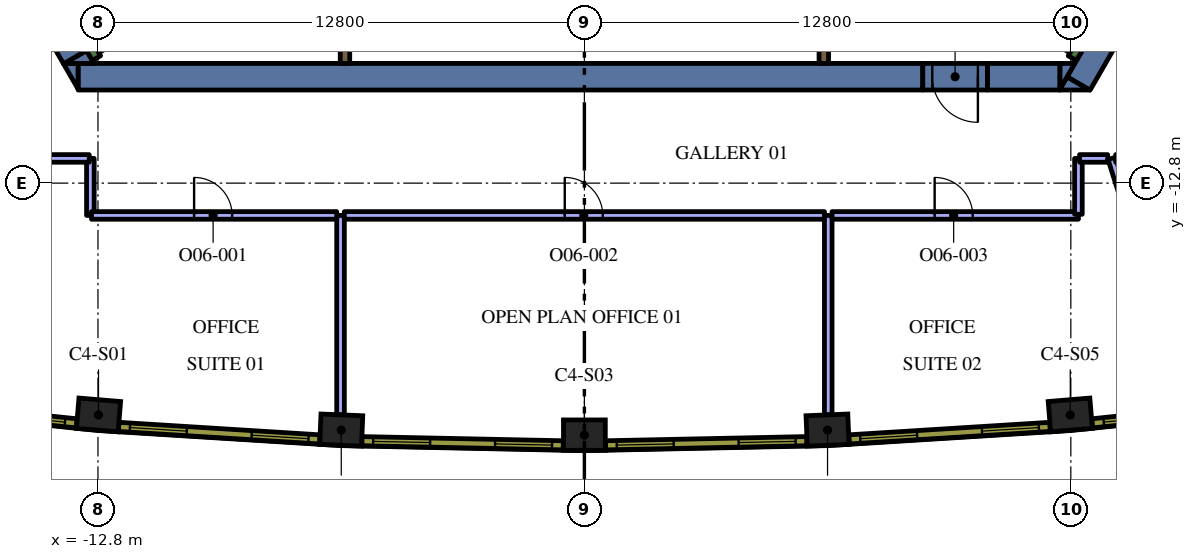
"""IFC4 building model, lengths in metres.
Left out: names, types, materials, properties, quantities, classifications, styles, units other than length and angle.
Written with IfcOpenShell. Run it as: python <this file> out.ifc"""

import sys

from ifc_helpers import new_model, si_unit, direction, frame, frame_2d, origin, origin_2d, place, context, subcontext, project, spatial, polyline, rectangle, outline, extrude, element, fill, save


model = new_model("IFC4")
c1 = context("Model", 3, precision=1e-05, world=origin(), true_north=direction((0.0, 1.0)))
c2 = subcontext(c1, "Body", "Model", "MODEL_VIEW")
j1 = project(units=[si_unit("LENGTHUNIT", "METRE"), si_unit("PLANEANGLEUNIT", "RADIAN")], contexts=[c1])
p1 = place(None, origin())
s1 = spatial("IfcSite", under=j1, at=p1, CompositionType="ELEMENT")
p2 = place(p1, origin())
s2 = spatial("IfcBuilding", under=s1, at=p2, CompositionType="ELEMENT")
p3 = place(p2, frame((0.0, 0.0, 201.6)))
s3 = spatial("IfcBuildingStorey", under=s2, at=p3, CompositionType="ELEMENT", Elevation=201.6)
for number, where, z_axis, x_axis in (
    (1, (-12.785, -18.9, 0.0), (0.0, 0.0, 1.0), (0.997, -0.083, 0.0)),
    (2, (-6.398, -19.298, 0.0), (0.0, 0.0, 1.0), (0.999, -0.041, 0.0)),
    (3, (0.0, -19.431, 0.0), (0.0, 0.0, 1.0), (1.0, 0.0, 0.0)),
    (4, (6.398, -19.298, 0.0), (0.0, 0.0, 1.0), (0.999, 0.041, 0.0)),
    (5, (12.785, -18.9, 0.0), (0.0, 0.0, 1.0), (0.997, 0.083, 0.0)),
):
    element("IfcColumn", number, at=place(p3, frame(where, z_axis=z_axis, x_axis=x_axis)), inside=s3, PredefinedType="COLUMN", context=c2, shape_type="SweptSolid", body=[
        extrude(rectangle(XDim=1.1, YDim=0.8, at=origin_2d()), origin(), (0.0, 0.0, 1.0), 4.2),
    ])
p4 = place(p3, frame((13.003, -10.179, 0.0), z_axis=(0.0, 0.0, 1.0), x_axis=(0.499972675833, 0.866041178825, 0.0)))
e6 = element("IfcWall", 6, at=p4, inside=s3, PredefinedType="SOLIDWALL", context=c2, shape_type="SweptSolid", body=[
    extrude(rectangle(XDim=3.829, YDim=0.7, at=frame_2d((1.915, 0.0))), origin(), (0.0, 0.0, 1.0), 4.2),
])
p5 = place(p3, origin())
e7 = element("IfcWall", 7, at=p5, inside=s3, PredefinedType="SOLIDWALL", context=c2, shape_type="SweptSolid", body=[
    extrude(outline(polyline([(12.5, -10.35), (12.698, -10.005), (13.296, -10.35), (12.5, -10.35)])), origin(), (0.0, 0.0, 1.0), 4.2),
])
p6 = place(p3, frame((10.604, -10.0, 0.0), z_axis=(0.0, 0.0, 1.0), x_axis=(1.0, 0.0, 0.0)))
e8 = element("IfcWall", 8, at=p6, inside=s3, PredefinedType="SOLIDWALL", context=c2, shape_type="SweptSolid", body=[
    extrude(rectangle(XDim=1.909, YDim=0.7, at=frame_2d((0.955, 0.0))), origin(), (0.0, 0.0, 1.0), 4.2),
])
e9 = element("IfcWall", 9, at=p5, inside=s3, PredefinedType="SOLIDWALL", context=c2, shape_type="SweptSolid", body=[
    extrude(outline(polyline([(12.904, -9.65), (12.516, -10.322), (12.516, -9.65), (12.904, -9.65)])), origin(), (0.0, 0.0, 1.0), 4.2),
])
p7 = place(p3, frame((8.904, -10.0, 0.0), z_axis=(0.0, 0.0, 1.0), x_axis=(-1.0, 0.0, 0.0)))
e10 = element("IfcWall", 10, at=p7, inside=s3, PredefinedType="SOLIDWALL", context=c2, shape_type="SweptSolid", body=[
    extrude(rectangle(XDim=22.226, YDim=0.7, at=frame_2d((11.113, 0.0))), origin(), (0.0, 0.0, 1.0), 4.2),
])
e11 = element("IfcWall", 11, at=p5, inside=s3, PredefinedType="SOLIDWALL", context=c2, shape_type="SweptSolid", body=[
    extrude(outline(polyline([(-13.712, -9.65), (-13.324, -9.65), (-13.324, -10.322), (-13.712, -9.65)])), origin(), (0.0, 0.0, 1.0), 4.2),
])
p8 = place(p3, frame((-13.402, -9.487, 0.0), z_axis=(0.0, 0.0, 1.0), x_axis=(-0.500020498207, 0.866013568815, 0.0)))
e12 = element("IfcWall", 12, at=p8, inside=s3, PredefinedType="SOLIDWALL", context=c2, shape_type="SweptSolid", body=[
    extrude(rectangle(XDim=3.829, YDim=0.7, at=frame_2d((1.915, 0.0))), origin(), (0.0, 0.0, 1.0), 4.2),
])
e13 = element("IfcWall", 13, at=p5, inside=s3, PredefinedType="SOLIDWALL", context=c2, shape_type="SweptSolid", body=[
    extrude(outline(polyline([(-12.904, -9.65), (-13.68, -9.65), (-13.098, -9.314), (-12.904, -9.65)])), origin(), (0.0, 0.0, 1.0), 4.2),
])
p9 = place(p3, frame((12.84, -9.511, 0.0), z_axis=(0.0, 0.0, 1.0), x_axis=(0.500048121057, 0.865997619297, 0.0)))
e14 = element("IfcWall", 14, at=p9, inside=s3, PredefinedType="SOLIDWALL", context=c2, shape_type="SweptSolid", body=[
    extrude(rectangle(XDim=3.634, YDim=0.25, at=frame_2d((1.817, 0.0))), origin(), (0.0, 0.0, 1.0), 4.2),
])
p10 = place(p3, frame((12.84, -9.261, 0.0), z_axis=(0.0, 0.0, 1.0), x_axis=(-0.866013990052, 0.500019768644, 0.0)))
e15 = element("IfcWall", 15, at=p10, inside=s3, PredefinedType="SOLIDWALL", context=c2, shape_type="SweptSolid", body=[
    extrude(rectangle(XDim=6.8, YDim=0.25, at=frame_2d((3.4, 0.0))), origin(), (0.0, 0.0, 1.0), 4.2),
])
p11 = place(p3, frame((-12.84, -9.511, 0.0), z_axis=(0.0, 0.0, 1.0), x_axis=(-0.499997733992, 0.866026712061, 0.0)))
e16 = element("IfcWall", 16, at=p11, inside=s3, PredefinedType="SOLIDWALL", context=c2, shape_type="SweptSolid", body=[
    extrude(rectangle(XDim=3.634, YDim=0.25, at=frame_2d((1.817, 0.0))), origin(), (0.0, 0.0, 1.0), 4.2),
])
p12 = place(p3, frame((-12.84, -9.261, 0.0), z_axis=(0.0, 0.0, 1.0), x_axis=(0.866016039709, 0.500016218704, 0.0)))
e17 = element("IfcWall", 17, at=p12, inside=s3, PredefinedType="SOLIDWALL", context=c2, shape_type="SweptSolid", body=[
    extrude(rectangle(XDim=7.05, YDim=0.25, at=frame_2d((3.525, 0.0))), origin(), (0.0, 0.0, 1.0), 4.2),
])
p13 = place(p3, frame((-6.3, -8.925, 0.0), z_axis=(0.0, 0.0, 1.0), x_axis=(0.0, -1.0, 0.0)))
e18 = element("IfcWall", 18, at=p13, inside=s3, PredefinedType="SOLIDWALL", context=c2, shape_type="SweptSolid", body=[
    extrude(rectangle(XDim=0.725, YDim=0.25, at=frame_2d((0.363, 0.0))), origin(), (0.0, 0.0, 1.0), 4.2),
])
p14 = place(p3, frame((6.3, -9.65, 0.0), z_axis=(0.0, 0.0, 1.0), x_axis=(0.0, 1.0, 0.0)))
e19 = element("IfcWall", 19, at=p14, inside=s3, PredefinedType="SOLIDWALL", context=c2, shape_type="SweptSolid", body=[
    extrude(rectangle(XDim=1.008, YDim=0.25, at=frame_2d((0.504, 0.0))), origin(), (0.0, 0.0, 1.0), 4.2),
])
p15 = place(p3, frame((10.604, -10.0, 0.0), z_axis=(0.0, 0.0, 1.0), x_axis=(-1.0, 0.0, 0.0)))
e20 = element("IfcWall", 20, at=p15, inside=s3, PredefinedType="SOLIDWALL", context=c2, shape_type="SweptSolid", body=[
    extrude(rectangle(XDim=1.7, YDim=0.7, at=frame_2d((0.85, 0.0))), origin(), (0.0, 0.0, 1.0), 4.2),
])
p16 = place(p15, frame((0.25, 0.0, 0.0)))
e21 = element("IfcOpeningElement", 21, at=p16, cuts=e20, PredefinedType="OPENING", context=c2, shape_type="SweptSolid", body=[
    extrude(rectangle(XDim=1.2, YDim=2.1, at=frame_2d((0.6, 1.05))), frame((0.0, 0.36, 0.0), z_axis=(0.0, -1.0, 0.0), x_axis=(1.0, 0.0, 0.0)), (0.0, 0.0, 1.0), 0.72),
])
p17 = place(p3, frame((-6.417, -13.65, 0.0), z_axis=(0.0, 0.0, 1.0), x_axis=(0.0, -1.0, 0.0)))
e22 = element("IfcWall", 22, at=p17, inside=s3, PredefinedType="PARTITIONING", context=c2, shape_type="SweptSolid", body=[
    extrude(rectangle(XDim=5.247, YDim=0.2, at=frame_2d((2.624, 0.0))), origin(), (0.0, 0.0, 1.0), 3.45),
])
p18 = place(p3, frame((-13.0, -12.15, 0.0), z_axis=(0.0, 0.0, 1.0), x_axis=(0.0, -1.0, 0.0)))
e23 = element("IfcWall", 23, at=p18, inside=s3, PredefinedType="PARTITIONING", context=c2, shape_type="SweptSolid", body=[
    extrude(rectangle(XDim=1.5, YDim=0.2, at=frame_2d((0.75, 0.0))), origin(), (0.0, 0.0, 1.0), 3.45),
])
p19 = place(p3, frame((-12.97, -13.65, 0.0), z_axis=(0.0, 0.0, 1.0), x_axis=(1.0, 0.0, 0.0)))
e24 = element("IfcWall", 24, at=p19, inside=s3, PredefinedType="PARTITIONING", context=c2, shape_type="SweptSolid", body=[
    extrude(rectangle(XDim=6.453, YDim=0.2, at=frame_2d((3.227, 0.0))), origin(), (0.0, 0.0, 1.0), 3.45),
])
p20 = place(p19, frame((2.7, 0.0, 0.0)))
e25 = element("IfcOpeningElement", 25, at=p20, cuts=e24, PredefinedType="OPENING", context=c2, shape_type="SweptSolid", body=[
    extrude(rectangle(XDim=1.0, YDim=2.1, at=frame_2d((0.5, 1.05))), frame((0.0, 0.11, 0.0), z_axis=(0.0, -1.0, 0.0), x_axis=(1.0, 0.0, 0.0)), (0.0, 0.0, 1.0), 0.22),
])
p21 = place(p3, frame((-14.347, -12.15, 0.0), z_axis=(0.0, 0.0, 1.0), x_axis=(1.0, 0.0, 0.0)))
e26 = element("IfcWall", 26, at=p21, inside=s3, PredefinedType="PARTITIONING", context=c2, shape_type="SweptSolid", body=[
    extrude(rectangle(XDim=1.317, YDim=0.2, at=frame_2d((0.659, 0.0))), origin(), (0.0, 0.0, 1.0), 3.45),
])
p22 = place(p3, frame((6.417, -13.65, 0.0), z_axis=(0.0, 0.0, 1.0), x_axis=(0.0, -1.0, 0.0)))
e27 = element("IfcWall", 27, at=p22, inside=s3, PredefinedType="PARTITIONING", context=c2, shape_type="SweptSolid", body=[
    extrude(rectangle(XDim=5.247, YDim=0.2, at=frame_2d((2.624, 0.0))), origin(), (0.0, 0.0, 1.0), 3.45),
])
p23 = place(p3, frame((-6.317, -13.65, 0.0), z_axis=(0.0, 0.0, 1.0), x_axis=(1.0, 0.0, 0.0)))
e28 = element("IfcWall", 28, at=p23, inside=s3, PredefinedType="PARTITIONING", context=c2, shape_type="SweptSolid", body=[
    extrude(rectangle(XDim=12.634, YDim=0.2, at=frame_2d((6.317, 0.0))), origin(), (0.0, 0.0, 1.0), 3.45),
])
p24 = place(p23, frame((5.8, 0.0, 0.0)))
e29 = element("IfcOpeningElement", 29, at=p24, cuts=e28, PredefinedType="OPENING", context=c2, shape_type="SweptSolid", body=[
    extrude(rectangle(XDim=1.0, YDim=2.1, at=frame_2d((0.5, 1.05))), frame((0.0, 0.11, 0.0), z_axis=(0.0, -1.0, 0.0), x_axis=(1.0, 0.0, 0.0)), (0.0, 0.0, 1.0), 0.22),
])
p25 = place(p3, frame((13.875, -12.15, 0.0), z_axis=(0.0, 0.0, 1.0), x_axis=(0.3005606746, -0.953762696316, 0.0)))
e30 = element("IfcWall", 30, at=p25, inside=s3, PredefinedType="PARTITIONING", context=c2, shape_type="SweptSolid", body=[
    extrude(rectangle(XDim=6.9, YDim=0.2, at=frame_2d((3.45, 0.0))), origin(), (0.0, 0.0, 1.0), 3.45),
])
p26 = place(p3, frame((6.517, -13.65, 0.0), z_axis=(0.0, 0.0, 1.0), x_axis=(1.0, 0.0, 0.0)))
e31 = element("IfcWall", 31, at=p26, inside=s3, PredefinedType="PARTITIONING", context=c2, shape_type="SweptSolid", body=[
    extrude(rectangle(XDim=6.483, YDim=0.2, at=frame_2d((3.242, 0.0))), origin(), (0.0, 0.0, 1.0), 3.45),
])
p27 = place(p26, frame((2.7, 0.0, 0.0)))
e32 = element("IfcOpeningElement", 32, at=p27, cuts=e31, PredefinedType="OPENING", context=c2, shape_type="SweptSolid", body=[
    extrude(rectangle(XDim=1.0, YDim=2.1, at=frame_2d((0.5, 1.05))), frame((0.0, 0.11, 0.0), z_axis=(0.0, -1.0, 0.0), x_axis=(1.0, 0.0, 0.0)), (0.0, 0.0, 1.0), 0.22),
])
p28 = place(p3, frame((13.0, -13.62, 0.0), z_axis=(0.0, 0.0, 1.0), x_axis=(0.0, 1.0, 0.0)))
e33 = element("IfcWall", 33, at=p28, inside=s3, PredefinedType="PARTITIONING", context=c2, shape_type="SweptSolid", body=[
    extrude(rectangle(XDim=1.47, YDim=0.2, at=frame_2d((0.735, 0.0))), origin(), (0.0, 0.0, 1.0), 3.45),
])
p29 = place(p3, frame((13.03, -12.15, 0.0), z_axis=(0.0, 0.0, 1.0), x_axis=(1.0, 0.0, 0.0)))
e34 = element("IfcWall", 34, at=p29, inside=s3, PredefinedType="PARTITIONING", context=c2, shape_type="SweptSolid", body=[
    extrude(rectangle(XDim=0.74, YDim=0.2, at=frame_2d((0.37, 0.0))), origin(), (0.0, 0.0, 1.0), 3.45),
])
p30 = place(p3, frame((13.98, -12.15, 0.0), z_axis=(0.0, 0.0, 1.0), x_axis=(1.0, 0.0, 0.0)))
e35 = element("IfcWall", 35, at=p30, inside=s3, PredefinedType="PARTITIONING", context=c2, shape_type="SweptSolid", body=[
    extrude(rectangle(XDim=0.367, YDim=0.2, at=frame_2d((0.184, 0.0))), origin(), (0.0, 0.0, 1.0), 3.45),
])
p31 = place(p3, frame((-18.644, -18.571, 0.0), z_axis=(0.0, 0.0, 1.0), x_axis=(0.994621961215, -0.103571976272, 0.0)))
e36 = element("IfcWall", 36, at=p31, inside=s3, PredefinedType="SOLIDWALL", context=c2, shape_type="SweptSolid", body=[
    extrude(rectangle(XDim=5.311, YDim=0.24, at=frame_2d((2.655, 0.0))), origin(), (0.0, 0.0, 1.0), 3.95),
])
p32 = place(p31, frame((0.271, 0.0, 0.9)))
e37 = element("IfcOpeningElement", 37, at=p32, cuts=e36, PredefinedType="OPENING", context=c2, shape_type="SweptSolid", body=[
    extrude(rectangle(XDim=1.5, YDim=2.55, at=frame_2d((0.75, 1.275))), frame((0.0, 0.13, 0.0), z_axis=(0.0, -1.0, 0.0), x_axis=(1.0, 0.0, 0.0)), (0.0, 0.0, 1.0), 0.26),
])
p33 = place(p31, frame((3.504, 0.0, 0.9)))
e38 = element("IfcOpeningElement", 38, at=p33, cuts=e36, PredefinedType="OPENING", context=c2, shape_type="SweptSolid", body=[
    extrude(rectangle(XDim=1.5, YDim=2.55, at=frame_2d((0.75, 1.275))), frame((0.0, 0.13, 0.0), z_axis=(0.0, -1.0, 0.0), x_axis=(1.0, 0.0, 0.0)), (0.0, 0.0, 1.0), 0.26),
])
p34 = place(p3, frame((-12.253, -19.213, 0.0), z_axis=(0.0, 0.0, 1.0), x_axis=(0.9980633213, -0.062206162685, 0.0)))
e39 = element("IfcWall", 39, at=p34, inside=s3, PredefinedType="SOLIDWALL", context=c2, shape_type="SweptSolid", body=[
    extrude(rectangle(XDim=5.298, YDim=0.24, at=frame_2d((2.649, 0.0))), origin(), (0.0, 0.0, 1.0), 3.95),
])
p35 = place(p34, frame((0.294, 0.0, 0.9)))
e40 = element("IfcOpeningElement", 40, at=p35, cuts=e39, PredefinedType="OPENING", context=c2, shape_type="SweptSolid", body=[
    extrude(rectangle(XDim=1.5, YDim=2.55, at=frame_2d((0.75, 1.275))), frame((0.0, 0.13, 0.0), z_axis=(0.0, -1.0, 0.0), x_axis=(1.0, 0.0, 0.0)), (0.0, 0.0, 1.0), 0.26),
])
p36 = place(p34, frame((3.504, 0.0, 0.9)))
e41 = element("IfcOpeningElement", 41, at=p36, cuts=e39, PredefinedType="OPENING", context=c2, shape_type="SweptSolid", body=[
    extrude(rectangle(XDim=1.5, YDim=2.55, at=frame_2d((0.75, 1.275))), frame((0.0, 0.13, 0.0), z_axis=(0.0, -1.0, 0.0), x_axis=(1.0, 0.0, 0.0)), (0.0, 0.0, 1.0), 0.26),
])
p37 = place(p3, frame((-5.854, -19.589, 0.0), z_axis=(0.0, 0.0, 1.0), x_axis=(0.999784035184, -0.020781794712, 0.0)))
e42 = element("IfcWall", 42, at=p37, inside=s3, PredefinedType="SOLIDWALL", context=c2, shape_type="SweptSolid", body=[
    extrude(rectangle(XDim=5.298, YDim=0.24, at=frame_2d((2.649, 0.0))), origin(), (0.0, 0.0, 1.0), 3.95),
])
p38 = place(p37, frame((0.294, 0.0, 0.9)))
e43 = element("IfcOpeningElement", 43, at=p38, cuts=e42, PredefinedType="OPENING", context=c2, shape_type="SweptSolid", body=[
    extrude(rectangle(XDim=1.5, YDim=2.55, at=frame_2d((0.75, 1.275))), frame((0.0, 0.13, 0.0), z_axis=(0.0, -1.0, 0.0), x_axis=(1.0, 0.0, 0.0)), (0.0, 0.0, 1.0), 0.26),
])
p39 = place(p37, frame((3.504, 0.0, 0.9)))
e44 = element("IfcOpeningElement", 44, at=p39, cuts=e42, PredefinedType="OPENING", context=c2, shape_type="SweptSolid", body=[
    extrude(rectangle(XDim=1.5, YDim=2.55, at=frame_2d((0.75, 1.275))), frame((0.0, 0.13, 0.0), z_axis=(0.0, -1.0, 0.0), x_axis=(1.0, 0.0, 0.0)), (0.0, 0.0, 1.0), 0.26),
])
p40 = place(p3, frame((0.556, -19.699, 0.0), z_axis=(0.0, 0.0, 1.0), x_axis=(0.999784035184, 0.020781794712, 0.0)))
e45 = element("IfcWall", 45, at=p40, inside=s3, PredefinedType="SOLIDWALL", context=c2, shape_type="SweptSolid", body=[
    extrude(rectangle(XDim=5.298, YDim=0.24, at=frame_2d((2.649, 0.0))), origin(), (0.0, 0.0, 1.0), 3.95),
])
p41 = place(p40, frame((0.294, 0.0, 0.9)))
e46 = element("IfcOpeningElement", 46, at=p41, cuts=e45, PredefinedType="OPENING", context=c2, shape_type="SweptSolid", body=[
    extrude(rectangle(XDim=1.5, YDim=2.55, at=frame_2d((0.75, 1.275))), frame((0.0, 0.13, 0.0), z_axis=(0.0, -1.0, 0.0), x_axis=(1.0, 0.0, 0.0)), (0.0, 0.0, 1.0), 0.26),
])
p42 = place(p40, frame((3.504, 0.0, 0.9)))
e47 = element("IfcOpeningElement", 47, at=p42, cuts=e45, PredefinedType="OPENING", context=c2, shape_type="SweptSolid", body=[
    extrude(rectangle(XDim=1.5, YDim=2.55, at=frame_2d((0.75, 1.275))), frame((0.0, 0.13, 0.0), z_axis=(0.0, -1.0, 0.0), x_axis=(1.0, 0.0, 0.0)), (0.0, 0.0, 1.0), 0.26),
])
p43 = place(p3, frame((6.965, -19.543, 0.0), z_axis=(0.0, 0.0, 1.0), x_axis=(0.9980633213, 0.062206162685, 0.0)))
e48 = element("IfcWall", 48, at=p43, inside=s3, PredefinedType="SOLIDWALL", context=c2, shape_type="SweptSolid", body=[
    extrude(rectangle(XDim=5.298, YDim=0.24, at=frame_2d((2.649, 0.0))), origin(), (0.0, 0.0, 1.0), 3.95),
])
p44 = place(p43, frame((0.295, 0.0, 0.9)))
e49 = element("IfcOpeningElement", 49, at=p44, cuts=e48, PredefinedType="OPENING", context=c2, shape_type="SweptSolid", body=[
    extrude(rectangle(XDim=1.5, YDim=2.55, at=frame_2d((0.75, 1.275))), frame((0.0, 0.13, 0.0), z_axis=(0.0, -1.0, 0.0), x_axis=(1.0, 0.0, 0.0)), (0.0, 0.0, 1.0), 0.26),
])
p45 = place(p43, frame((3.504, 0.0, 0.9)))
e50 = element("IfcOpeningElement", 50, at=p45, cuts=e48, PredefinedType="OPENING", context=c2, shape_type="SweptSolid", body=[
    extrude(rectangle(XDim=1.5, YDim=2.55, at=frame_2d((0.75, 1.275))), frame((0.0, 0.13, 0.0), z_axis=(0.0, -1.0, 0.0), x_axis=(1.0, 0.0, 0.0)), (0.0, 0.0, 1.0), 0.26),
])
p46 = place(p3, frame((13.362, -19.121, 0.0), z_axis=(0.0, 0.0, 1.0), x_axis=(0.994621961215, 0.103571976272, 0.0)))
e51 = element("IfcWall", 51, at=p46, inside=s3, PredefinedType="SOLIDWALL", context=c2, shape_type="SweptSolid", body=[
    extrude(rectangle(XDim=5.311, YDim=0.24, at=frame_2d((2.655, 0.0))), origin(), (0.0, 0.0, 1.0), 3.95),
])
p47 = place(p46, frame((0.306, 0.0, 0.9)))
e52 = element("IfcOpeningElement", 52, at=p47, cuts=e51, PredefinedType="OPENING", context=c2, shape_type="SweptSolid", body=[
    extrude(rectangle(XDim=1.5, YDim=2.55, at=frame_2d((0.75, 1.275))), frame((0.0, 0.13, 0.0), z_axis=(0.0, -1.0, 0.0), x_axis=(1.0, 0.0, 0.0)), (0.0, 0.0, 1.0), 0.26),
])
p48 = place(p46, frame((3.539, 0.0, 0.9)))
e53 = element("IfcOpeningElement", 53, at=p48, cuts=e51, PredefinedType="OPENING", context=c2, shape_type="SweptSolid", body=[
    extrude(rectangle(XDim=1.5, YDim=2.55, at=frame_2d((0.75, 1.275))), frame((0.0, 0.13, 0.0), z_axis=(0.0, -1.0, 0.0), x_axis=(1.0, 0.0, 0.0)), (0.0, 0.0, 1.0), 0.26),
])
p49 = place(p16, origin())
e54 = element("IfcDoor", 54, at=p49, inside=s3, OperationType="SINGLE_SWING_LEFT", PredefinedType="DOOR", context=c2, shape_type="SweptSolid", body=[
    extrude(rectangle(XDim=1.2, YDim=2.1, at=frame_2d((0.6, 1.05))), frame((0.0, 0.025, 0.0), z_axis=(0.0, -1.0, 0.0), x_axis=(1.0, 0.0, 0.0)), (0.0, 0.0, 1.0), 0.05),
])
fill(e21, e54)
p50 = place(p20, origin())
e55 = element("IfcDoor", 55, at=p50, inside=s3, OperationType="SINGLE_SWING_LEFT", PredefinedType="DOOR", context=c2, shape_type="SweptSolid", body=[
    extrude(rectangle(XDim=1.0, YDim=2.1, at=frame_2d((0.5, 1.05))), frame((0.0, 0.025, 0.0), z_axis=(0.0, -1.0, 0.0), x_axis=(1.0, 0.0, 0.0)), (0.0, 0.0, 1.0), 0.05),
])
fill(e25, e55)
p51 = place(p24, origin())
e56 = element("IfcDoor", 56, at=p51, inside=s3, OperationType="SINGLE_SWING_LEFT", PredefinedType="DOOR", context=c2, shape_type="SweptSolid", body=[
    extrude(rectangle(XDim=1.0, YDim=2.1, at=frame_2d((0.5, 1.05))), frame((0.0, 0.025, 0.0), z_axis=(0.0, -1.0, 0.0), x_axis=(1.0, 0.0, 0.0)), (0.0, 0.0, 1.0), 0.05),
])
fill(e29, e56)
p52 = place(p27, origin())
e57 = element("IfcDoor", 57, at=p52, inside=s3, OperationType="SINGLE_SWING_LEFT", PredefinedType="DOOR", context=c2, shape_type="SweptSolid", body=[
    extrude(rectangle(XDim=1.0, YDim=2.1, at=frame_2d((0.5, 1.05))), frame((0.0, 0.025, 0.0), z_axis=(0.0, -1.0, 0.0), x_axis=(1.0, 0.0, 0.0)), (0.0, 0.0, 1.0), 0.05),
])
fill(e32, e57)
p53 = place(p33, origin())
e58 = element("IfcWindow", 58, at=p53, inside=s3, PartitioningType="SINGLE_PANEL", PredefinedType="WINDOW", context=c2, shape_type="SweptSolid", body=[
    extrude(rectangle(XDim=1.5, YDim=2.55, at=frame_2d((0.75, 1.275))), frame((0.0, 0.04, 0.0), z_axis=(0.0, -1.0, 0.0), x_axis=(1.0, 0.0, 0.0)), (0.0, 0.0, 1.0), 0.06),
])
fill(e38, e58)
p54 = place(p35, origin())
e59 = element("IfcWindow", 59, at=p54, inside=s3, PartitioningType="SINGLE_PANEL", PredefinedType="WINDOW", context=c2, shape_type="SweptSolid", body=[
    extrude(rectangle(XDim=1.5, YDim=2.55, at=frame_2d((0.75, 1.275))), frame((0.0, 0.04, 0.0), z_axis=(0.0, -1.0, 0.0), x_axis=(1.0, 0.0, 0.0)), (0.0, 0.0, 1.0), 0.06),
])
fill(e40, e59)
p55 = place(p36, origin())
e60 = element("IfcWindow", 60, at=p55, inside=s3, PartitioningType="SINGLE_PANEL", PredefinedType="WINDOW", context=c2, shape_type="SweptSolid", body=[
    extrude(rectangle(XDim=1.5, YDim=2.55, at=frame_2d((0.75, 1.275))), frame((0.0, 0.04, 0.0), z_axis=(0.0, -1.0, 0.0), x_axis=(1.0, 0.0, 0.0)), (0.0, 0.0, 1.0), 0.06),
])
fill(e41, e60)
p56 = place(p38, origin())
e61 = element("IfcWindow", 61, at=p56, inside=s3, PartitioningType="SINGLE_PANEL", PredefinedType="WINDOW", context=c2, shape_type="SweptSolid", body=[
    extrude(rectangle(XDim=1.5, YDim=2.55, at=frame_2d((0.75, 1.275))), frame((0.0, 0.04, 0.0), z_axis=(0.0, -1.0, 0.0), x_axis=(1.0, 0.0, 0.0)), (0.0, 0.0, 1.0), 0.06),
])
fill(e43, e61)
p57 = place(p39, origin())
e62 = element("IfcWindow", 62, at=p57, inside=s3, PartitioningType="SINGLE_PANEL", PredefinedType="WINDOW", context=c2, shape_type="SweptSolid", body=[
    extrude(rectangle(XDim=1.5, YDim=2.55, at=frame_2d((0.75, 1.275))), frame((0.0, 0.04, 0.0), z_axis=(0.0, -1.0, 0.0), x_axis=(1.0, 0.0, 0.0)), (0.0, 0.0, 1.0), 0.06),
])
fill(e44, e62)
p58 = place(p41, origin())
e63 = element("IfcWindow", 63, at=p58, inside=s3, PartitioningType="SINGLE_PANEL", PredefinedType="WINDOW", context=c2, shape_type="SweptSolid", body=[
    extrude(rectangle(XDim=1.5, YDim=2.55, at=frame_2d((0.75, 1.275))), frame((0.0, 0.04, 0.0), z_axis=(0.0, -1.0, 0.0), x_axis=(1.0, 0.0, 0.0)), (0.0, 0.0, 1.0), 0.06),
])
fill(e46, e63)
p59 = place(p42, origin())
e64 = element("IfcWindow", 64, at=p59, inside=s3, PartitioningType="SINGLE_PANEL", PredefinedType="WINDOW", context=c2, shape_type="SweptSolid", body=[
    extrude(rectangle(XDim=1.5, YDim=2.55, at=frame_2d((0.75, 1.275))), frame((0.0, 0.04, 0.0), z_axis=(0.0, -1.0, 0.0), x_axis=(1.0, 0.0, 0.0)), (0.0, 0.0, 1.0), 0.06),
])
fill(e47, e64)
p60 = place(p44, origin())
e65 = element("IfcWindow", 65, at=p60, inside=s3, PartitioningType="SINGLE_PANEL", PredefinedType="WINDOW", context=c2, shape_type="SweptSolid", body=[
    extrude(rectangle(XDim=1.5, YDim=2.55, at=frame_2d((0.75, 1.275))), frame((0.0, 0.04, 0.0), z_axis=(0.0, -1.0, 0.0), x_axis=(1.0, 0.0, 0.0)), (0.0, 0.0, 1.0), 0.06),
])
fill(e49, e65)
p61 = place(p45, origin())
e66 = element("IfcWindow", 66, at=p61, inside=s3, PartitioningType="SINGLE_PANEL", PredefinedType="WINDOW", context=c2, shape_type="SweptSolid", body=[
    extrude(rectangle(XDim=1.5, YDim=2.55, at=frame_2d((0.75, 1.275))), frame((0.0, 0.04, 0.0), z_axis=(0.0, -1.0, 0.0), x_axis=(1.0, 0.0, 0.0)), (0.0, 0.0, 1.0), 0.06),
])
fill(e50, e66)
p62 = place(p47, origin())
e67 = element("IfcWindow", 67, at=p62, inside=s3, PartitioningType="SINGLE_PANEL", PredefinedType="WINDOW", context=c2, shape_type="SweptSolid", body=[
    extrude(rectangle(XDim=1.5, YDim=2.55, at=frame_2d((0.75, 1.275))), frame((0.0, 0.04, 0.0), z_axis=(0.0, -1.0, 0.0), x_axis=(1.0, 0.0, 0.0)), (0.0, 0.0, 1.0), 0.06),
])
fill(e52, e67)
save(model, sys.argv[1])
